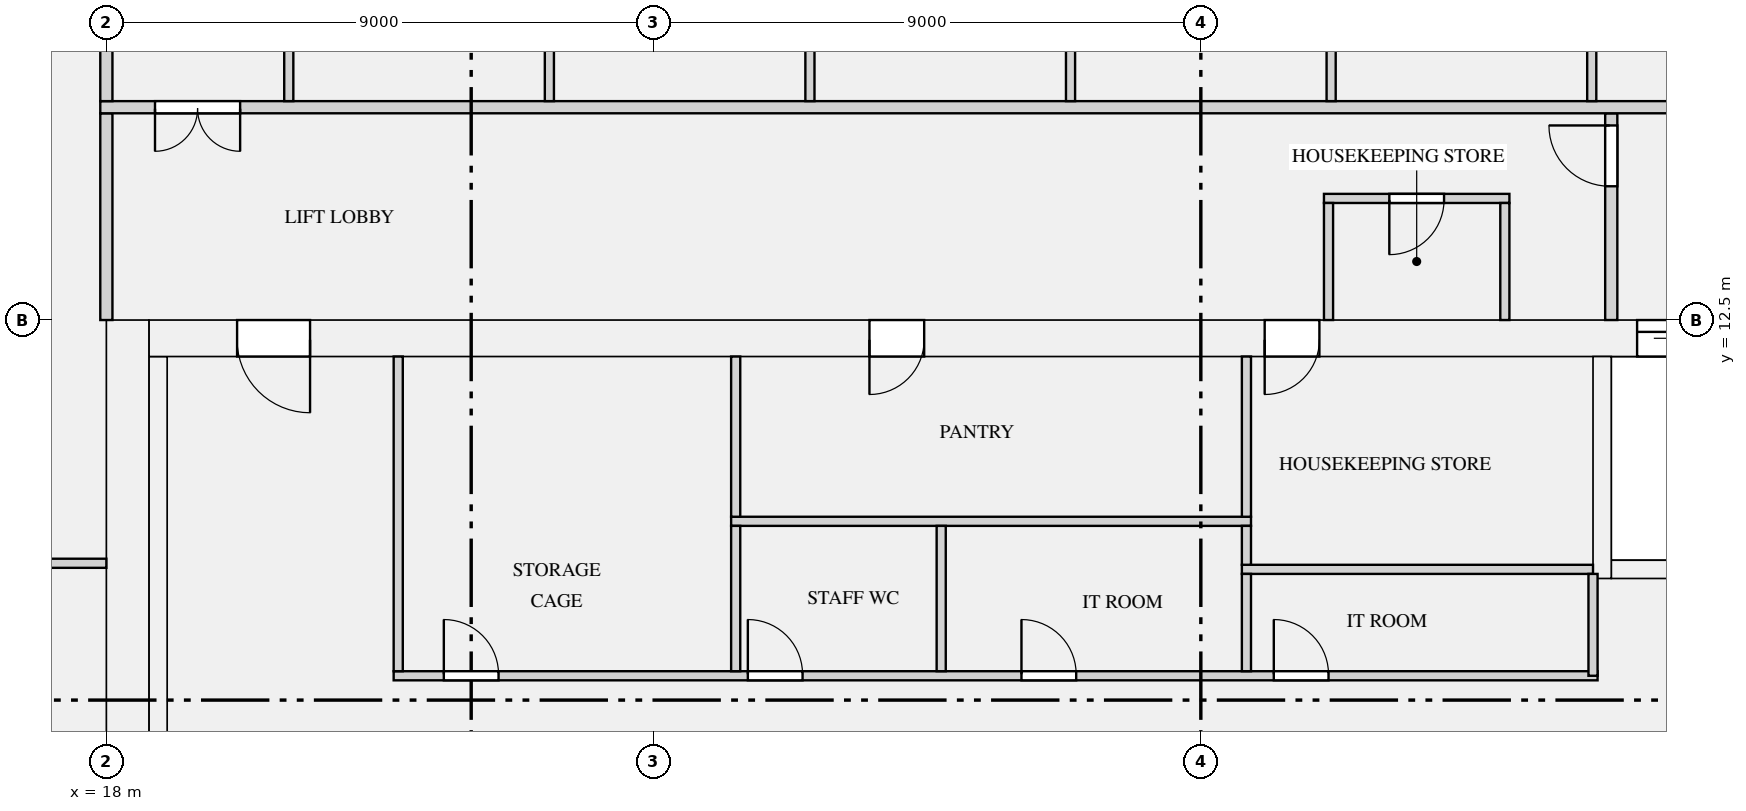
"""IFC4 building model, lengths in metres.
Left out: names, types, materials, properties, quantities, classifications, styles, units other than length and angle.
Written with IfcOpenShell. Run it as: python <this file> out.ifc"""

import sys

from ifc_helpers import new_model, si_unit, direction, frame, frame_2d, origin, place, context, subcontext, project, spatial, rectangle, extrude, element, fill, save


model = new_model("IFC4")
c1 = context("Model", 3, precision=1e-05, world=origin(), true_north=direction((0.0, 1.0)))
c2 = subcontext(c1, "Body", "Model", "MODEL_VIEW")
j1 = project(units=[si_unit("LENGTHUNIT", "METRE"), si_unit("PLANEANGLEUNIT", "RADIAN")], contexts=[c1])
p1 = place(None, origin())
s1 = spatial("IfcSite", under=j1, at=p1, CompositionType="ELEMENT")
p2 = place(p1, origin())
s2 = spatial("IfcBuilding", under=s1, at=p2, CompositionType="ELEMENT")
p3 = place(p2, frame((0.0, 0.0, 172.8)))
s3 = spatial("IfcBuildingStorey", under=s2, at=p3, CompositionType="ELEMENT", Elevation=172.8)
p4 = place(p3, frame((18.35, 0.0, 0.0), z_axis=(0.0, 0.0, 1.0), x_axis=(0.0, 1.0, 0.0)))
e1 = element("IfcWall", 1, at=p4, inside=s3, PredefinedType="SHEAR", context=c2, shape_type="SweptSolid", body=[
    extrude(rectangle(XDim=12.5, YDim=0.7, at=frame_2d((6.25, 0.0))), origin(), (0.0, 0.0, 1.0), 3.15),
])
p5 = place(p3, frame((18.7, 12.2, 0.0), z_axis=(0.0, 0.0, 1.0), x_axis=(1.0, 0.0, 0.0)))
e2 = element("IfcWall", 2, at=p5, inside=s3, PredefinedType="SHEAR", context=c2, shape_type="SweptSolid", body=[
    extrude(rectangle(XDim=34.6, YDim=0.6, at=frame_2d((17.3, 0.0))), origin(), (0.0, 0.0, 1.0), 3.15),
])
p6 = place(p5, frame((24.475, 0.0, 0.0)))
e3 = element("IfcOpeningElement", 3, at=p6, cuts=e2, PredefinedType="OPENING", context=c2, shape_type="SweptSolid", body=[
    extrude(rectangle(XDim=1.1, YDim=2.1, at=frame_2d((0.55, 1.05))), frame((0.0, 0.31, 0.0), z_axis=(0.0, -1.0, 0.0), x_axis=(1.0, 0.0, 0.0)), (0.0, 0.0, 1.0), 0.62),
])
p7 = place(p5, frame((26.725, 0.0, 0.0)))
e4 = element("IfcOpeningElement", 4, at=p7, cuts=e2, PredefinedType="OPENING", context=c2, shape_type="SweptSolid", body=[
    extrude(rectangle(XDim=1.1, YDim=2.1, at=frame_2d((0.55, 1.05))), frame((0.0, 0.31, 0.0), z_axis=(0.0, -1.0, 0.0), x_axis=(1.0, 0.0, 0.0)), (0.0, 0.0, 1.0), 0.62),
])
p8 = place(p5, frame((28.975, 0.0, 0.0)))
e5 = element("IfcOpeningElement", 5, at=p8, cuts=e2, PredefinedType="OPENING", context=c2, shape_type="SweptSolid", body=[
    extrude(rectangle(XDim=1.1, YDim=2.1, at=frame_2d((0.55, 1.05))), frame((0.0, 0.31, 0.0), z_axis=(0.0, -1.0, 0.0), x_axis=(1.0, 0.0, 0.0)), (0.0, 0.0, 1.0), 0.62),
])
p9 = place(p5, frame((11.85, 0.0, 0.0)))
e6 = element("IfcOpeningElement", 6, at=p9, cuts=e2, PredefinedType="OPENING", context=c2, shape_type="SweptSolid", body=[
    extrude(rectangle(XDim=0.9, YDim=2.1, at=frame_2d((0.45, 1.05))), frame((0.0, 0.31, 0.0), z_axis=(0.0, -1.0, 0.0), x_axis=(1.0, 0.0, 0.0)), (0.0, 0.0, 1.0), 0.62),
])
p10 = place(p5, frame((18.35, 0.0, 0.0)))
e7 = element("IfcOpeningElement", 7, at=p10, cuts=e2, PredefinedType="OPENING", context=c2, shape_type="SweptSolid", body=[
    extrude(rectangle(XDim=0.9, YDim=2.1, at=frame_2d((0.45, 1.05))), frame((0.0, 0.31, 0.0), z_axis=(0.0, -1.0, 0.0), x_axis=(1.0, 0.0, 0.0)), (0.0, 0.0, 1.0), 0.62),
])
p11 = place(p5, frame((1.45, 0.0, 0.0)))
e8 = element("IfcOpeningElement", 8, at=p11, cuts=e2, PredefinedType="OPENING", context=c2, shape_type="SweptSolid", body=[
    extrude(rectangle(XDim=1.2, YDim=2.1, at=frame_2d((0.6, 1.05))), frame((0.0, 0.31, 0.0), z_axis=(0.0, -1.0, 0.0), x_axis=(1.0, 0.0, 0.0)), (0.0, 0.0, 1.0), 0.62),
])
p12 = place(p5, frame((31.95, 0.0, 0.0)))
e9 = element("IfcOpeningElement", 9, at=p12, cuts=e2, PredefinedType="OPENING", context=c2, shape_type="SweptSolid", body=[
    extrude(rectangle(XDim=1.2, YDim=2.1, at=frame_2d((0.6, 1.05))), frame((0.0, 0.31, 0.0), z_axis=(0.0, -1.0, 0.0), x_axis=(1.0, 0.0, 0.0)), (0.0, 0.0, 1.0), 0.62),
])
p13 = place(p3, frame((18.85, 1.0, 0.0), z_axis=(0.0, 0.0, 1.0), x_axis=(0.0, 1.0, 0.0)))
e10 = element("IfcWall", 10, at=p13, inside=s3, PredefinedType="SHEAR", context=c2, shape_type="SweptSolid", body=[
    extrude(rectangle(XDim=10.9, YDim=0.3, at=frame_2d((5.45, 0.0))), origin(), (0.0, 0.0, 1.0), 3.15),
])
p14 = place(p3, frame((42.75, 8.4, 0.0), z_axis=(0.0, 0.0, 1.0), x_axis=(1.0, 0.0, 0.0)))
e11 = element("IfcWall", 11, at=p14, inside=s3, PredefinedType="SHEAR", context=c2, shape_type="SweptSolid", body=[
    extrude(rectangle(XDim=1.95, YDim=0.3, at=frame_2d((0.975, 0.0))), origin(), (0.0, 0.0, 1.0), 3.15),
])
p15 = place(p3, frame((42.6, 8.25, 0.0), z_axis=(0.0, 0.0, 1.0), x_axis=(0.0, 1.0, 0.0)))
e12 = element("IfcWall", 12, at=p15, inside=s3, PredefinedType="SHEAR", context=c2, shape_type="SweptSolid", body=[
    extrude(rectangle(XDim=3.65, YDim=0.3, at=frame_2d((1.825, 0.0))), origin(), (0.0, 0.0, 1.0), 3.15),
])
p16 = place(p3, frame((22.725, 6.65, 0.0), z_axis=(0.0, 0.0, 1.0), x_axis=(1.0, 0.0, 0.0)))
e13 = element("IfcWall", 13, at=p16, inside=s3, PredefinedType="PARTITIONING", context=c2, shape_type="SweptSolid", body=[
    extrude(rectangle(XDim=19.8, YDim=0.15, at=frame_2d((9.9, 0.0))), origin(), (0.0, 0.0, 1.0), 2.83),
])
p17 = place(p16, frame((0.825, 0.0, 0.0)))
e14 = element("IfcOpeningElement", 14, at=p17, cuts=e13, PredefinedType="OPENING", context=c2, shape_type="SweptSolid", body=[
    extrude(rectangle(XDim=0.9, YDim=2.1, at=frame_2d((0.45, 1.05))), frame((0.0, 0.085, 0.0), z_axis=(0.0, -1.0, 0.0), x_axis=(1.0, 0.0, 0.0)), (0.0, 0.0, 1.0), 0.17),
])
p18 = place(p16, frame((5.825, 0.0, 0.0)))
e15 = element("IfcOpeningElement", 15, at=p18, cuts=e13, PredefinedType="OPENING", context=c2, shape_type="SweptSolid", body=[
    extrude(rectangle(XDim=0.9, YDim=2.1, at=frame_2d((0.45, 1.05))), frame((0.0, 0.085, 0.0), z_axis=(0.0, -1.0, 0.0), x_axis=(1.0, 0.0, 0.0)), (0.0, 0.0, 1.0), 0.17),
])
p19 = place(p16, frame((10.325, 0.0, 0.0)))
e16 = element("IfcOpeningElement", 16, at=p19, cuts=e13, PredefinedType="OPENING", context=c2, shape_type="SweptSolid", body=[
    extrude(rectangle(XDim=0.9, YDim=2.1, at=frame_2d((0.45, 1.05))), frame((0.0, 0.085, 0.0), z_axis=(0.0, -1.0, 0.0), x_axis=(1.0, 0.0, 0.0)), (0.0, 0.0, 1.0), 0.17),
])
p20 = place(p16, frame((14.475, 0.0, 0.0)))
e17 = element("IfcOpeningElement", 17, at=p20, cuts=e13, PredefinedType="OPENING", context=c2, shape_type="SweptSolid", body=[
    extrude(rectangle(XDim=0.9, YDim=2.1, at=frame_2d((0.45, 1.05))), frame((0.0, 0.085, 0.0), z_axis=(0.0, -1.0, 0.0), x_axis=(1.0, 0.0, 0.0)), (0.0, 0.0, 1.0), 0.17),
])
p21 = place(p3, frame((36.675, 8.4, 0.0), z_axis=(0.0, 0.0, 1.0), x_axis=(1.0, 0.0, 0.0)))
e18 = element("IfcWall", 18, at=p21, inside=s3, PredefinedType="PARTITIONING", context=c2, shape_type="SweptSolid", body=[
    extrude(rectangle(XDim=5.775, YDim=0.15, at=frame_2d((2.887, 0.0))), origin(), (0.0, 0.0, 1.0), 2.83),
])
p22 = place(p3, frame((28.275, 9.19, 0.0), z_axis=(0.0, 0.0, 1.0), x_axis=(1.0, 0.0, 0.0)))
e19 = element("IfcWall", 19, at=p22, inside=s3, PredefinedType="PARTITIONING", context=c2, shape_type="SweptSolid", body=[
    extrude(rectangle(XDim=8.55, YDim=0.15, at=frame_2d((4.275, 0.0))), origin(), (0.0, 0.0, 1.0), 2.83),
])
p23 = place(p3, frame((38.025, 14.5, 0.0), z_axis=(0.0, 0.0, 1.0), x_axis=(1.0, 0.0, 0.0)))
e20 = element("IfcWall", 20, at=p23, inside=s3, PredefinedType="PARTITIONING", context=c2, shape_type="SweptSolid", body=[
    extrude(rectangle(XDim=3.05, YDim=0.15, at=frame_2d((1.525, 0.0))), origin(), (0.0, 0.0, 1.0), 2.83),
])
p24 = place(p23, frame((1.075, 0.0, 0.0)))
e21 = element("IfcOpeningElement", 21, at=p24, cuts=e20, PredefinedType="OPENING", context=c2, shape_type="SweptSolid", body=[
    extrude(rectangle(XDim=0.9, YDim=2.1, at=frame_2d((0.45, 1.05))), frame((0.0, 0.085, 0.0), z_axis=(0.0, -1.0, 0.0), x_axis=(1.0, 0.0, 0.0)), (0.0, 0.0, 1.0), 0.17),
])
p25 = place(p3, frame((42.45, 6.65, 0.0), z_axis=(0.0, 0.0, 1.0), x_axis=(0.0, 1.0, 0.0)))
e22 = element("IfcWall", 22, at=p25, inside=s3, PredefinedType="PARTITIONING", context=c2, shape_type="SweptSolid", body=[
    extrude(rectangle(XDim=1.675, YDim=0.15, at=frame_2d((0.837, 0.0))), origin(), (0.0, 0.0, 1.0), 2.83),
])
p26 = place(p3, frame((22.8, 6.725, 0.0), z_axis=(0.0, 0.0, 1.0), x_axis=(0.0, 1.0, 0.0)))
e23 = element("IfcWall", 23, at=p26, inside=s3, PredefinedType="PARTITIONING", context=c2, shape_type="SweptSolid", body=[
    extrude(rectangle(XDim=5.175, YDim=0.15, at=frame_2d((2.587, 0.0))), origin(), (0.0, 0.0, 1.0), 2.83),
])
for number, where, z_axis, x_axis in (
    (24, (28.35, 6.725, 0.0), (0.0, 0.0, 1.0), (0.0, 1.0, 0.0)),
    (25, (31.73, 6.725, 0.0), (0.0, 0.0, 1.0), (0.0, 1.0, 0.0)),
):
    element("IfcWall", number, at=place(p3, frame(where, z_axis=z_axis, x_axis=x_axis)), inside=s3, PredefinedType="PARTITIONING", context=c2, shape_type="SweptSolid", body=[
        extrude(rectangle(XDim=2.39, YDim=0.15, at=frame_2d((1.195, 0.0))), origin(), (0.0, 0.0, 1.0), 2.83),
    ])
p27 = place(p3, frame((36.75, 6.725, 0.0), z_axis=(0.0, 0.0, 1.0), x_axis=(0.0, 1.0, 0.0)))
e26 = element("IfcWall", 26, at=p27, inside=s3, PredefinedType="PARTITIONING", context=c2, shape_type="SweptSolid", body=[
    extrude(rectangle(XDim=1.6, YDim=0.15, at=frame_2d((0.8, 0.0))), origin(), (0.0, 0.0, 1.0), 2.83),
])
p28 = place(p3, frame((36.75, 8.475, 0.0), z_axis=(0.0, 0.0, 1.0), x_axis=(0.0, 1.0, 0.0)))
e27 = element("IfcWall", 27, at=p28, inside=s3, PredefinedType="PARTITIONING", context=c2, shape_type="SweptSolid", body=[
    extrude(rectangle(XDim=0.64, YDim=0.15, at=frame_2d((0.32, 0.0))), origin(), (0.0, 0.0, 1.0), 2.83),
])
for number, where, z_axis, x_axis in (
    (28, (28.35, 9.265, 0.0), (0.0, 0.0, 1.0), (0.0, 1.0, 0.0)),
    (29, (36.75, 9.265, 0.0), (0.0, 0.0, 1.0), (0.0, 1.0, 0.0)),
):
    element("IfcWall", number, at=place(p3, frame(where, z_axis=z_axis, x_axis=x_axis)), inside=s3, PredefinedType="PARTITIONING", context=c2, shape_type="SweptSolid", body=[
        extrude(rectangle(XDim=2.635, YDim=0.15, at=frame_2d((1.317, 0.0))), origin(), (0.0, 0.0, 1.0), 2.83),
    ])
p29 = place(p3, frame((18.0, 12.5, 0.0), z_axis=(0.0, 0.0, 1.0), x_axis=(0.0, 1.0, 0.0)))
e30 = element("IfcWall", 30, at=p29, inside=s3, PredefinedType="PARTITIONING", context=c2, shape_type="SweptSolid", body=[
    extrude(rectangle(XDim=3.4, YDim=0.2, at=frame_2d((1.7, 0.0))), origin(), (0.0, 0.0, 1.0), 2.83),
])
for number, where, z_axis, x_axis in (
    (31, (38.1, 12.5, 0.0), (0.0, 0.0, 1.0), (0.0, 1.0, 0.0)),
    (32, (41.0, 12.5, 0.0), (0.0, 0.0, 1.0), (0.0, 1.0, 0.0)),
):
    element("IfcWall", number, at=place(p3, frame(where, z_axis=z_axis, x_axis=x_axis)), inside=s3, PredefinedType="PARTITIONING", context=c2, shape_type="SweptSolid", body=[
        extrude(rectangle(XDim=1.925, YDim=0.15, at=frame_2d((0.962, 0.0))), origin(), (0.0, 0.0, 1.0), 2.83),
    ])
p30 = place(p3, frame((42.75, 12.5, 0.0), z_axis=(0.0, 0.0, 1.0), x_axis=(0.0, 1.0, 0.0)))
e33 = element("IfcWall", 33, at=p30, inside=s3, PredefinedType="PARTITIONING", context=c2, shape_type="SweptSolid", body=[
    extrude(rectangle(XDim=3.4, YDim=0.2, at=frame_2d((1.7, 0.0))), origin(), (0.0, 0.0, 1.0), 2.83),
])
p31 = place(p30, frame((2.2, 0.0, 0.0)))
e34 = element("IfcOpeningElement", 34, at=p31, cuts=e33, PredefinedType="OPENING", context=c2, shape_type="SweptSolid", body=[
    extrude(rectangle(XDim=1.0, YDim=2.1, at=frame_2d((0.5, 1.05))), frame((0.0, 0.11, 0.0), z_axis=(0.0, -1.0, 0.0), x_axis=(1.0, 0.0, 0.0)), (0.0, 0.0, 1.0), 0.22),
])
p32 = place(p3, frame((5.2, 8.5, 0.0), z_axis=(0.0, 0.0, 1.0), x_axis=(1.0, 0.0, 0.0)))
e35 = element("IfcWall", 35, at=p32, inside=s3, PredefinedType="PARTITIONING", context=c2, shape_type="SweptSolid", body=[
    extrude(rectangle(XDim=12.8, YDim=0.15, at=frame_2d((6.4, 0.0))), origin(), (0.0, 0.0, 1.0), 2.83),
])
p33 = place(p32, frame((10.1, 0.0, 0.0)))
e36 = element("IfcOpeningElement", 36, at=p33, cuts=e35, PredefinedType="OPENING", context=c2, shape_type="SweptSolid", body=[
    extrude(rectangle(XDim=0.9, YDim=2.1, at=frame_2d((0.45, 1.05))), frame((0.0, 0.085, 0.0), z_axis=(0.0, -1.0, 0.0), x_axis=(1.0, 0.0, 0.0)), (0.0, 0.0, 1.0), 0.17),
])
p34 = place(p32, frame((5.3, 0.0, 0.0)))
e37 = element("IfcOpeningElement", 37, at=p34, cuts=e35, PredefinedType="OPENING", context=c2, shape_type="SweptSolid", body=[
    extrude(rectangle(XDim=1.5, YDim=2.1, at=frame_2d((0.75, 1.05))), frame((0.0, 0.085, 0.0), z_axis=(0.0, -1.0, 0.0), x_axis=(1.0, 0.0, 0.0)), (0.0, 0.0, 1.0), 0.17),
])
p35 = place(p3, frame((17.9, 16.0, 0.0), z_axis=(0.0, 0.0, 1.0), x_axis=(1.0, 0.0, 0.0)))
e38 = element("IfcWall", 38, at=p35, inside=s3, PredefinedType="PARTITIONING", context=c2, shape_type="SweptSolid", body=[
    extrude(rectangle(XDim=36.2, YDim=0.2, at=frame_2d((18.1, 0.0))), origin(), (0.0, 0.0, 1.0), 2.83),
])
p36 = place(p35, frame((0.9, 0.0, 0.0)))
e39 = element("IfcOpeningElement", 39, at=p36, cuts=e38, PredefinedType="OPENING", context=c2, shape_type="SweptSolid", body=[
    extrude(rectangle(XDim=1.4, YDim=2.1, at=frame_2d((0.7, 1.05))), frame((0.0, 0.11, 0.0), z_axis=(0.0, -1.0, 0.0), x_axis=(1.0, 0.0, 0.0)), (0.0, 0.0, 1.0), 0.22),
])
p37 = place(p35, frame((33.9, 0.0, 0.0)))
e40 = element("IfcOpeningElement", 40, at=p37, cuts=e38, PredefinedType="OPENING", context=c2, shape_type="SweptSolid", body=[
    extrude(rectangle(XDim=1.4, YDim=2.1, at=frame_2d((0.7, 1.05))), frame((0.0, 0.11, 0.0), z_axis=(0.0, -1.0, 0.0), x_axis=(1.0, 0.0, 0.0)), (0.0, 0.0, 1.0), 0.22),
])
p38 = place(p3, frame((18.0, 16.1, 0.0), z_axis=(0.0, 0.0, 1.0), x_axis=(0.0, 1.0, 0.0)))
e41 = element("IfcWall", 41, at=p38, inside=s3, PredefinedType="PARTITIONING", context=c2, shape_type="SweptSolid", body=[
    extrude(rectangle(XDim=7.8, YDim=0.2, at=frame_2d((3.9, 0.0))), origin(), (0.0, 0.0, 1.0), 2.83),
])
p39 = place(p38, frame((1.85, 0.0, 0.0)))
e42 = element("IfcOpeningElement", 42, at=p39, cuts=e41, PredefinedType="OPENING", context=c2, shape_type="SweptSolid", body=[
    extrude(rectangle(XDim=1.1, YDim=2.1, at=frame_2d((0.55, 1.05))), frame((0.0, 0.11, 0.0), z_axis=(0.0, -1.0, 0.0), x_axis=(1.0, 0.0, 0.0)), (0.0, 0.0, 1.0), 0.22),
])
p40 = place(p3, frame((21.0, 16.1, 0.0), z_axis=(0.0, 0.0, 1.0), x_axis=(0.0, 1.0, 0.0)))
e43 = element("IfcWall", 43, at=p40, inside=s3, PredefinedType="PARTITIONING", context=c2, shape_type="SweptSolid", body=[
    extrude(rectangle(XDim=4.825, YDim=0.15, at=frame_2d((2.413, 0.0))), origin(), (0.0, 0.0, 1.0), 2.83),
])
p41 = place(p40, frame((1.95, 0.0, 0.0)))
e44 = element("IfcOpeningElement", 44, at=p41, cuts=e43, PredefinedType="OPENING", context=c2, shape_type="SweptSolid", body=[
    extrude(rectangle(XDim=0.9, YDim=2.1, at=frame_2d((0.45, 1.05))), frame((0.0, 0.085, 0.0), z_axis=(0.0, -1.0, 0.0), x_axis=(1.0, 0.0, 0.0)), (0.0, 0.0, 1.0), 0.17),
])
for number, where, z_axis, x_axis in (
    (45, (25.286, 16.1, 0.0), (0.0, 0.0, 1.0), (0.0, 1.0, 0.0)),
    (46, (29.571, 16.1, 0.0), (0.0, 0.0, 1.0), (0.0, 1.0, 0.0)),
    (47, (33.857, 16.1, 0.0), (0.0, 0.0, 1.0), (0.0, 1.0, 0.0)),
    (48, (38.143, 16.1, 0.0), (0.0, 0.0, 1.0), (0.0, 1.0, 0.0)),
    (49, (42.429, 16.1, 0.0), (0.0, 0.0, 1.0), (0.0, 1.0, 0.0)),
):
    element("IfcWall", number, at=place(p3, frame(where, z_axis=z_axis, x_axis=x_axis)), inside=s3, PredefinedType="PARTITIONING", context=c2, shape_type="SweptSolid", body=[
        extrude(rectangle(XDim=4.825, YDim=0.15, at=frame_2d((2.413, 0.0))), origin(), (0.0, 0.0, 1.0), 2.83),
    ])
p42 = place(p6, origin())
e50 = element("IfcDoor", 50, at=p42, inside=s3, OperationType="DOUBLE_DOOR_SLIDING", PredefinedType="DOOR", context=c2, shape_type="SweptSolid", body=[
    extrude(rectangle(XDim=1.1, YDim=2.1, at=frame_2d((0.55, 1.05))), frame((0.0, 0.025, 0.0), z_axis=(0.0, -1.0, 0.0), x_axis=(1.0, 0.0, 0.0)), (0.0, 0.0, 1.0), 0.05),
])
fill(e3, e50)
p43 = place(p24, frame((0.9, 0.0, 0.0), z_axis=(0.0, 0.0, 1.0), x_axis=(-1.0, 0.0, 0.0)))
e51 = element("IfcDoor", 51, at=p43, inside=s3, OperationType="SINGLE_SWING_RIGHT", PredefinedType="DOOR", context=c2, shape_type="SweptSolid", body=[
    extrude(rectangle(XDim=0.9, YDim=2.1, at=frame_2d((0.45, 1.05))), frame((0.0, 0.025, 0.0), z_axis=(0.0, -1.0, 0.0), x_axis=(1.0, 0.0, 0.0)), (0.0, 0.0, 1.0), 0.05),
])
fill(e21, e51)
p44 = place(p17, origin())
e52 = element("IfcDoor", 52, at=p44, inside=s3, OperationType="SINGLE_SWING_LEFT", PredefinedType="DOOR", context=c2, shape_type="SweptSolid", body=[
    extrude(rectangle(XDim=0.9, YDim=2.1, at=frame_2d((0.45, 1.05))), frame((0.0, 0.025, 0.0), z_axis=(0.0, -1.0, 0.0), x_axis=(1.0, 0.0, 0.0)), (0.0, 0.0, 1.0), 0.05),
])
fill(e14, e52)
p45 = place(p18, origin())
e53 = element("IfcDoor", 53, at=p45, inside=s3, OperationType="SINGLE_SWING_LEFT", PredefinedType="DOOR", context=c2, shape_type="SweptSolid", body=[
    extrude(rectangle(XDim=0.9, YDim=2.1, at=frame_2d((0.45, 1.05))), frame((0.0, 0.025, 0.0), z_axis=(0.0, -1.0, 0.0), x_axis=(1.0, 0.0, 0.0)), (0.0, 0.0, 1.0), 0.05),
])
fill(e15, e53)
p46 = place(p19, origin())
e54 = element("IfcDoor", 54, at=p46, inside=s3, OperationType="SINGLE_SWING_LEFT", PredefinedType="DOOR", context=c2, shape_type="SweptSolid", body=[
    extrude(rectangle(XDim=0.9, YDim=2.1, at=frame_2d((0.45, 1.05))), frame((0.0, 0.025, 0.0), z_axis=(0.0, -1.0, 0.0), x_axis=(1.0, 0.0, 0.0)), (0.0, 0.0, 1.0), 0.05),
])
fill(e16, e54)
p47 = place(p9, frame((0.9, 0.0, 0.0), z_axis=(0.0, 0.0, 1.0), x_axis=(-1.0, 0.0, 0.0)))
e55 = element("IfcDoor", 55, at=p47, inside=s3, OperationType="SINGLE_SWING_RIGHT", PredefinedType="DOOR", context=c2, shape_type="SweptSolid", body=[
    extrude(rectangle(XDim=0.9, YDim=2.1, at=frame_2d((0.45, 1.05))), frame((0.0, 0.025, 0.0), z_axis=(0.0, -1.0, 0.0), x_axis=(1.0, 0.0, 0.0)), (0.0, 0.0, 1.0), 0.05),
])
fill(e6, e55)
p48 = place(p20, origin())
e56 = element("IfcDoor", 56, at=p48, inside=s3, OperationType="SINGLE_SWING_LEFT", PredefinedType="DOOR", context=c2, shape_type="SweptSolid", body=[
    extrude(rectangle(XDim=0.9, YDim=2.1, at=frame_2d((0.45, 1.05))), frame((0.0, 0.025, 0.0), z_axis=(0.0, -1.0, 0.0), x_axis=(1.0, 0.0, 0.0)), (0.0, 0.0, 1.0), 0.05),
])
fill(e17, e56)
p49 = place(p10, frame((0.9, 0.0, 0.0), z_axis=(0.0, 0.0, 1.0), x_axis=(-1.0, 0.0, 0.0)))
e57 = element("IfcDoor", 57, at=p49, inside=s3, OperationType="SINGLE_SWING_RIGHT", PredefinedType="DOOR", context=c2, shape_type="SweptSolid", body=[
    extrude(rectangle(XDim=0.9, YDim=2.1, at=frame_2d((0.45, 1.05))), frame((0.0, 0.025, 0.0), z_axis=(0.0, -1.0, 0.0), x_axis=(1.0, 0.0, 0.0)), (0.0, 0.0, 1.0), 0.05),
])
fill(e7, e57)
p50 = place(p11, frame((1.2, 0.0, 0.0), z_axis=(0.0, 0.0, 1.0), x_axis=(-1.0, 0.0, 0.0)))
e58 = element("IfcDoor", 58, at=p50, inside=s3, OperationType="SINGLE_SWING_LEFT", PredefinedType="DOOR", context=c2, shape_type="SweptSolid", body=[
    extrude(rectangle(XDim=1.2, YDim=2.1, at=frame_2d((0.6, 1.05))), frame((0.0, 0.025, 0.0), z_axis=(0.0, -1.0, 0.0), x_axis=(1.0, 0.0, 0.0)), (0.0, 0.0, 1.0), 0.05),
])
fill(e8, e58)
p51 = place(p31, origin())
e59 = element("IfcDoor", 59, at=p51, inside=s3, OperationType="SINGLE_SWING_RIGHT", PredefinedType="DOOR", context=c2, shape_type="SweptSolid", body=[
    extrude(rectangle(XDim=1.0, YDim=2.1, at=frame_2d((0.5, 1.05))), frame((0.0, 0.025, 0.0), z_axis=(0.0, -1.0, 0.0), x_axis=(1.0, 0.0, 0.0)), (0.0, 0.0, 1.0), 0.05),
])
fill(e34, e59)
p52 = place(p36, frame((1.4, 0.0, 0.0), z_axis=(0.0, 0.0, 1.0), x_axis=(-1.0, 0.0, 0.0)))
e60 = element("IfcDoor", 60, at=p52, inside=s3, OperationType="DOUBLE_DOOR_SINGLE_SWING", PredefinedType="DOOR", context=c2, shape_type="SweptSolid", body=[
    extrude(rectangle(XDim=1.4, YDim=2.1, at=frame_2d((0.7, 1.05))), frame((0.0, 0.025, 0.0), z_axis=(0.0, -1.0, 0.0), x_axis=(1.0, 0.0, 0.0)), (0.0, 0.0, 1.0), 0.05),
])
fill(e39, e60)
save(model, sys.argv[1])
